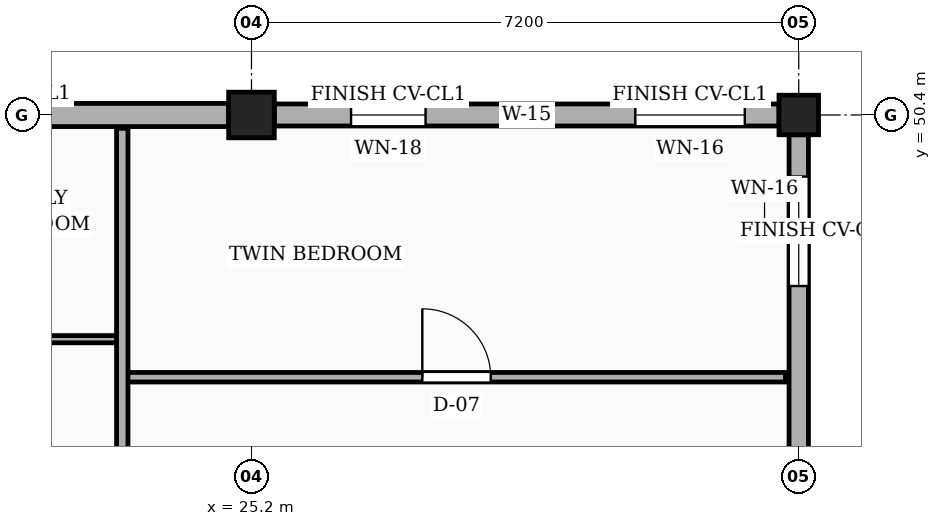
"""IFC4 building model, lengths in metres.
Left out: names, types, materials, properties, quantities, classifications, styles, units other than length and angle.
Written with IfcOpenShell. Run it as: python <this file> out.ifc"""

import sys

from ifc_helpers import new_model, si_unit, direction, frame, frame_2d, origin, origin_2d, place, context, subcontext, project, spatial, rectangle, circle, extrude, element, fill, save


model = new_model("IFC4")
c1 = context("Model", 3, precision=1e-05, world=origin(), true_north=direction((0.0, 1.0)))
c2 = subcontext(c1, "Body", "Model", "MODEL_VIEW")
j1 = project(units=[si_unit("LENGTHUNIT", "METRE"), si_unit("PLANEANGLEUNIT", "RADIAN")], contexts=[c1])
p1 = place(None, origin())
s1 = spatial("IfcSite", under=j1, at=p1, CompositionType="ELEMENT")
p2 = place(p1, origin())
s2 = spatial("IfcBuilding", under=s1, at=p2, CompositionType="ELEMENT")
p3 = place(p2, origin())
s3 = spatial("IfcBuildingStorey", under=s2, at=p3, CompositionType="ELEMENT", Elevation=0.0)
p4 = place(p3, frame((25.2, 50.4, 0.0), z_axis=(0.0, 0.0, 1.0), x_axis=(1.0, 0.0, 0.0)))
e1 = element("IfcColumn", 1, at=p4, inside=s3, PredefinedType="COLUMN", context=c2, shape_type="SweptSolid", body=[
    extrude(rectangle(XDim=0.6, YDim=0.6, at=origin_2d()), origin(), (0.0, 0.0, 1.0), 4.5),
])
p5 = place(p3, frame((32.4, 50.4, 0.0), z_axis=(0.0, 0.0, 1.0), x_axis=(1.0, 0.0, 0.0)))
e2 = element("IfcColumn", 2, at=p5, inside=s3, PredefinedType="COLUMN", context=c2, shape_type="SweptSolid", body=[
    extrude(circle(Radius=0.26, at=origin_2d()), origin(), (0.0, 0.0, 1.0), 4.5),
])
p6 = place(p3, frame((32.4, 43.5, 0.0), z_axis=(0.0, 0.0, 1.0), x_axis=(0.0, 1.0, 0.0)))
e3 = element("IfcWall", 3, at=p6, inside=s3, PredefinedType="SOLIDWALL", context=c2, shape_type="SweptSolid", body=[
    extrude(rectangle(XDim=6.64, YDim=0.255, at=frame_2d((3.32, 0.0))), origin(), (0.0, 0.0, 1.0), 3.79),
])
p7 = place(p6, frame((0.45, 0.0, 0.78)))
e4 = element("IfcOpeningElement", 4, at=p7, cuts=e3, PredefinedType="OPENING", context=c2, shape_type="SweptSolid", body=[
    extrude(rectangle(XDim=1.28, YDim=1.26, at=frame_2d((0.64, 0.63))), frame((0.0, 0.137, 0.0), z_axis=(0.0, -1.0, 0.0), x_axis=(1.0, 0.0, 0.0)), (0.0, 0.0, 1.0), 0.275),
])
p8 = place(p6, frame((4.65, 0.0, 0.78)))
e5 = element("IfcOpeningElement", 5, at=p8, cuts=e3, PredefinedType="OPENING", context=c2, shape_type="SweptSolid", body=[
    extrude(rectangle(XDim=1.44, YDim=1.26, at=frame_2d((0.72, 0.63))), frame((0.0, 0.137, 0.0), z_axis=(0.0, -1.0, 0.0), x_axis=(1.0, 0.0, 0.0)), (0.0, 0.0, 1.0), 0.275),
])
p9 = place(p3, frame((32.14, 50.4, 0.0), z_axis=(0.0, 0.0, 1.0), x_axis=(-1.0, 0.0, 0.0)))
e6 = element("IfcWall", 6, at=p9, inside=s3, PredefinedType="SOLIDWALL", context=c2, shape_type="SweptSolid", body=[
    extrude(rectangle(XDim=6.64, YDim=0.29, at=frame_2d((3.32, 0.0))), origin(), (0.0, 0.0, 1.0), 3.79),
])
p10 = place(p9, frame((0.45, 0.0, 0.78)))
e7 = element("IfcOpeningElement", 7, at=p10, cuts=e6, PredefinedType="OPENING", context=c2, shape_type="SweptSolid", body=[
    extrude(rectangle(XDim=1.44, YDim=1.26, at=frame_2d((0.72, 0.63))), frame((0.0, 0.155, 0.0), z_axis=(0.0, -1.0, 0.0), x_axis=(1.0, 0.0, 0.0)), (0.0, 0.0, 1.0), 0.31),
])
p11 = place(p9, frame((4.65, 0.0, 0.78)))
e8 = element("IfcOpeningElement", 8, at=p11, cuts=e6, PredefinedType="OPENING", context=c2, shape_type="SweptSolid", body=[
    extrude(rectangle(XDim=0.98, YDim=1.36, at=frame_2d((0.49, 0.68))), frame((0.0, 0.155, 0.0), z_axis=(0.0, -1.0, 0.0), x_axis=(1.0, 0.0, 0.0)), (0.0, 0.0, 1.0), 0.31),
])
p12 = place(p3, frame((24.9, 50.4, 0.0), z_axis=(0.0, 0.0, 1.0), x_axis=(-1.0, 0.0, 0.0)))
e9 = element("IfcWall", 9, at=p12, inside=s3, PredefinedType="SOLIDWALL", context=c2, shape_type="SweptSolid", body=[
    extrude(rectangle(XDim=6.6, YDim=0.305, at=frame_2d((3.3, 0.0))), origin(), (0.0, 0.0, 1.0), 3.79),
])
p13 = place(p12, frame((2.61, 0.0, 0.78)))
e10 = element("IfcOpeningElement", 10, at=p13, cuts=e9, PredefinedType="OPENING", context=c2, shape_type="SweptSolid", body=[
    extrude(rectangle(XDim=0.98, YDim=1.36, at=frame_2d((0.49, 0.68))), frame((0.0, 0.163, 0.0), z_axis=(0.0, -1.0, 0.0), x_axis=(1.0, 0.0, 0.0)), (0.0, 0.0, 1.0), 0.325),
])
p14 = place(p12, frame((5.11, 0.0, 0.78)))
e11 = element("IfcOpeningElement", 11, at=p14, cuts=e9, PredefinedType="OPENING", context=c2, shape_type="SweptSolid", body=[
    extrude(rectangle(XDim=1.04, YDim=1.26, at=frame_2d((0.52, 0.63))), frame((0.0, 0.163, 0.0), z_axis=(0.0, -1.0, 0.0), x_axis=(1.0, 0.0, 0.0)), (0.0, 0.0, 1.0), 0.325),
])
p15 = place(p3, frame((23.57, 46.95, 0.0), z_axis=(0.0, 0.0, 1.0), x_axis=(1.0, 0.0, 0.0)))
e12 = element("IfcWall", 12, at=p15, inside=s3, PredefinedType="PARTITIONING", context=c2, shape_type="SweptSolid", body=[
    extrude(rectangle(XDim=8.655, YDim=0.125, at=frame_2d((4.328, 0.0))), origin(), (0.0, 0.0, 1.0), 3.655),
])
p16 = place(p15, frame((3.877, 0.0, 0.0)))
e13 = element("IfcOpeningElement", 13, at=p16, cuts=e12, PredefinedType="OPENING", context=c2, shape_type="SweptSolid", body=[
    extrude(rectangle(XDim=0.9, YDim=2.1, at=frame_2d((0.45, 1.05))), frame((0.0, 0.073, 0.0), z_axis=(0.0, -1.0, 0.0), x_axis=(1.0, 0.0, 0.0)), (0.0, 0.0, 1.0), 0.145),
])
p17 = place(p3, frame((20.19, 47.45, 0.0), z_axis=(0.0, 0.0, 1.0), x_axis=(1.0, 0.0, 0.0)))
e14 = element("IfcWall", 14, at=p17, inside=s3, PredefinedType="PARTITIONING", context=c2, shape_type="SweptSolid", body=[
    extrude(rectangle(XDim=3.24, YDim=0.095, at=frame_2d((1.62, 0.0))), origin(), (0.0, 0.0, 1.0), 3.655),
])
p18 = place(p17, frame((1.17, 0.0, 0.0)))
e15 = element("IfcOpeningElement", 15, at=p18, cuts=e14, PredefinedType="OPENING", context=c2, shape_type="SweptSolid", body=[
    extrude(rectangle(XDim=0.9, YDim=2.05, at=frame_2d((0.45, 1.025))), frame((0.0, 0.058, 0.0), z_axis=(0.0, -1.0, 0.0), x_axis=(1.0, 0.0, 0.0)), (0.0, 0.0, 1.0), 0.115),
])
p19 = place(p3, frame((23.5, 43.34, 0.0), z_axis=(0.0, 0.0, 1.0), x_axis=(0.0, 1.0, 0.0)))
e16 = element("IfcWall", 16, at=p19, inside=s3, PredefinedType="PARTITIONING", context=c2, shape_type="SweptSolid", body=[
    extrude(rectangle(XDim=6.885, YDim=0.15, at=frame_2d((3.442, 0.0))), origin(), (0.0, 0.0, 1.0), 3.655),
])
p20 = place(p19, frame((1.31, 0.0, 0.0)))
e17 = element("IfcOpeningElement", 17, at=p20, cuts=e16, PredefinedType="OPENING", context=c2, shape_type="SweptSolid", body=[
    extrude(rectangle(XDim=0.95, YDim=2.1, at=frame_2d((0.475, 1.05))), frame((0.0, 0.085, 0.0), z_axis=(0.0, -1.0, 0.0), x_axis=(1.0, 0.0, 0.0)), (0.0, 0.0, 1.0), 0.17),
])
p21 = place(p8, origin())
e18 = element("IfcWindow", 18, at=p21, inside=s3, PartitioningType="SINGLE_PANEL", PredefinedType="WINDOW", context=c2, shape_type="SweptSolid", body=[
    extrude(rectangle(XDim=1.44, YDim=1.26, at=frame_2d((0.72, 0.63))), frame((0.0, 0.03, 0.0), z_axis=(0.0, -1.0, 0.0), x_axis=(1.0, 0.0, 0.0)), (0.0, 0.0, 1.0), 0.06),
])
fill(e5, e18)
p22 = place(p10, origin())
e19 = element("IfcWindow", 19, at=p22, inside=s3, PartitioningType="SINGLE_PANEL", PredefinedType="WINDOW", context=c2, shape_type="SweptSolid", body=[
    extrude(rectangle(XDim=1.44, YDim=1.26, at=frame_2d((0.72, 0.63))), frame((0.0, 0.03, 0.0), z_axis=(0.0, -1.0, 0.0), x_axis=(1.0, 0.0, 0.0)), (0.0, 0.0, 1.0), 0.06),
])
fill(e7, e19)
p23 = place(p11, origin())
e20 = element("IfcWindow", 20, at=p23, inside=s3, PartitioningType="SINGLE_PANEL", PredefinedType="WINDOW", context=c2, shape_type="SweptSolid", body=[
    extrude(rectangle(XDim=0.98, YDim=1.36, at=frame_2d((0.49, 0.68))), frame((0.0, 0.03, 0.0), z_axis=(0.0, -1.0, 0.0), x_axis=(1.0, 0.0, 0.0)), (0.0, 0.0, 1.0), 0.06),
])
fill(e8, e20)
p24 = place(p16, origin())
e21 = element("IfcDoor", 21, at=p24, inside=s3, OperationType="SINGLE_SWING_LEFT", PredefinedType="DOOR", context=c2, shape_type="SweptSolid", body=[
    extrude(rectangle(XDim=0.9, YDim=2.1, at=frame_2d((0.45, 1.05))), frame((0.0, 0.025, 0.0), z_axis=(0.0, -1.0, 0.0), x_axis=(1.0, 0.0, 0.0)), (0.0, 0.0, 1.0), 0.05),
])
fill(e13, e21)
save(model, sys.argv[1])
